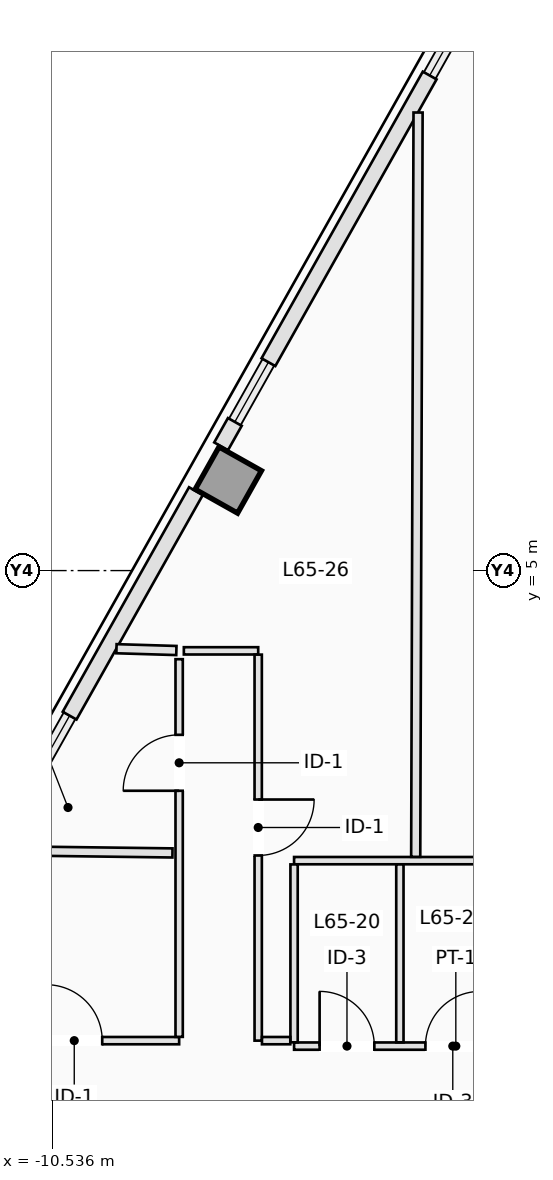
"""IFC4 building model, lengths in metres.
Left out: names, types, materials, properties, quantities, classifications, styles, units other than length and angle.
Written with IfcOpenShell. Run it as: python <this file> out.ifc"""

import sys

from ifc_helpers import new_model, si_unit, direction, frame, frame_2d, origin, origin_2d, place, context, subcontext, project, spatial, rectangle, extrude, element, fill, save


model = new_model("IFC4")
c1 = context("Model", 3, precision=1e-05, world=origin(), true_north=direction((0.0, 1.0)))
c2 = subcontext(c1, "Body", "Model", "MODEL_VIEW")
j1 = project(units=[si_unit("LENGTHUNIT", "METRE"), si_unit("PLANEANGLEUNIT", "RADIAN")], contexts=[c1])
p1 = place(None, origin())
s1 = spatial("IfcSite", under=j1, at=p1, CompositionType="ELEMENT")
p2 = place(p1, origin())
s2 = spatial("IfcBuilding", under=s1, at=p2, CompositionType="ELEMENT")
p3 = place(p2, frame((0.0, 0.0, 235.9)))
s3 = spatial("IfcBuildingStorey", under=s2, at=p3, CompositionType="ELEMENT", Elevation=235.9)
p4 = place(p3, frame((-7.642, 6.489, 0.0), z_axis=(0.0, 0.0, 1.0), x_axis=(-0.871575139605, 0.490261946333, 0.0)))
e1 = element("IfcColumn", 1, at=p4, inside=s3, PredefinedType="COLUMN", context=c2, shape_type="SweptSolid", body=[
    extrude(rectangle(XDim=0.8, YDim=0.8, at=origin_2d()), origin(), (0.0, 0.0, 1.0), 3.5),
])
p5 = place(p3, frame((-7.76, 7.044, 0.0), z_axis=(0.0, 0.0, 1.0), x_axis=(0.490412424957, 0.871490478116, 0.0)))
e2 = element("IfcWall", 2, at=p5, inside=s3, PredefinedType="STANDARD", context=c2, shape_type="SweptSolid", body=[
    extrude(rectangle(XDim=0.46, YDim=0.26, at=frame_2d((0.23, 0.0))), origin(), (0.0, 0.0, 1.0), 3.25),
])
p6 = place(p3, frame((-6.982, 8.427, 0.0), z_axis=(0.0, 0.0, 1.0), x_axis=(0.490265525523, 0.871573126297, 0.0)))
e3 = element("IfcWall", 3, at=p6, inside=s3, PredefinedType="STANDARD", context=c2, shape_type="SweptSolid", body=[
    extrude(rectangle(XDim=5.409, YDim=0.26, at=frame_2d((2.705, 0.0))), origin(), (0.0, 0.0, 1.0), 3.25),
])
p7 = place(p3, frame((-10.251, 2.615, 0.0), z_axis=(0.0, 0.0, 1.0), x_axis=(0.490269447258, 0.871570920284, 0.0)))
e4 = element("IfcWall", 4, at=p7, inside=s3, PredefinedType="STANDARD", context=c2, shape_type="SweptSolid", body=[
    extrude(rectangle(XDim=4.237, YDim=0.26, at=frame_2d((2.118, 0.0))), origin(), (0.0, 0.0, 1.0), 3.25),
])
p8 = place(p3, frame((-6.56, -2.82, 0.0), z_axis=(0.0, 0.0, 1.0), x_axis=(1.0, 0.0, 0.0)))
e5 = element("IfcWall", 5, at=p8, inside=s3, PredefinedType="PARTITIONING", context=c2, shape_type="SweptSolid", body=[
    extrude(rectangle(XDim=5.32, YDim=0.12, at=frame_2d((2.66, 0.0))), origin(), (0.0, 0.0, 1.0), 2.943),
])
p9 = place(p8, frame((0.42, 0.0, 0.0)))
e6 = element("IfcOpeningElement", 6, at=p9, cuts=e5, PredefinedType="OPENING", context=c2, shape_type="SweptSolid", body=[
    extrude(rectangle(XDim=0.9, YDim=2.12, at=frame_2d((0.45, 1.06))), frame((0.0, 0.07, 0.0), z_axis=(0.0, -1.0, 0.0), x_axis=(1.0, 0.0, 0.0)), (0.0, 0.0, 1.0), 0.14),
])
p10 = place(p8, frame((2.16, 0.0, 0.0)))
e7 = element("IfcOpeningElement", 7, at=p10, cuts=e5, PredefinedType="OPENING", context=c2, shape_type="SweptSolid", body=[
    extrude(rectangle(XDim=0.9, YDim=2.12, at=frame_2d((0.45, 1.06))), frame((0.0, 0.07, 0.0), z_axis=(0.0, -1.0, 0.0), x_axis=(1.0, 0.0, 0.0)), (0.0, 0.0, 1.0), 0.14),
])
p11 = place(p8, frame((3.92, 0.0, 0.0)))
e8 = element("IfcOpeningElement", 8, at=p11, cuts=e5, PredefinedType="OPENING", context=c2, shape_type="SweptSolid", body=[
    extrude(rectangle(XDim=0.9, YDim=2.12, at=frame_2d((0.45, 1.06))), frame((0.0, 0.07, 0.0), z_axis=(0.0, -1.0, 0.0), x_axis=(1.0, 0.0, 0.0)), (0.0, 0.0, 1.0), 0.14),
])
p12 = place(p3, frame((-6.56, 0.23, 0.0), z_axis=(0.0, 0.0, 1.0), x_axis=(1.0, 0.0, 0.0)))
e9 = element("IfcWall", 9, at=p12, inside=s3, PredefinedType="PARTITIONING", context=c2, shape_type="SweptSolid", body=[
    extrude(rectangle(XDim=5.32, YDim=0.12, at=frame_2d((2.66, 0.0))), origin(), (0.0, 0.0, 1.0), 3.25),
])
for number, where, z_axis, x_axis in (
    (10, (-6.56, -2.758, 0.0), (0.0, 0.0, 1.0), (0.0, 1.0, 0.0)),
    (11, (-4.82, -2.758, 0.0), (0.0, 0.0, 1.0), (0.0, 1.0, 0.0)),
):
    element("IfcWall", number, at=place(p3, frame(where, z_axis=z_axis, x_axis=x_axis)), inside=s3, PredefinedType="PARTITIONING", context=c2, shape_type="SweptSolid", body=[
        extrude(rectangle(XDim=2.926, YDim=0.12, at=frame_2d((1.463, 0.0))), origin(), (0.0, 0.0, 1.0), 3.25),
    ])
p13 = place(p3, frame((-11.838, -2.73, 0.0), z_axis=(0.0, 0.0, 1.0), x_axis=(1.0, 0.0, 0.0)))
e12 = element("IfcWall", 12, at=p13, inside=s3, PredefinedType="PARTITIONING", context=c2, shape_type="SweptSolid", body=[
    extrude(rectangle(XDim=3.388, YDim=0.12, at=frame_2d((1.694, 0.0))), origin(), (0.0, 0.0, 1.0), 3.25),
])
p14 = place(p13, frame((1.203, 0.0, 0.0)))
e13 = element("IfcOpeningElement", 13, at=p14, cuts=e12, PredefinedType="OPENING", context=c2, shape_type="SweptSolid", body=[
    extrude(rectangle(XDim=0.92, YDim=2.12, at=frame_2d((0.46, 1.06))), frame((0.0, 0.07, 0.0), z_axis=(0.0, -1.0, 0.0), x_axis=(1.0, 0.0, 0.0)), (0.0, 0.0, 1.0), 0.14),
])
p15 = place(p3, frame((-8.45, -2.668, 0.0), z_axis=(0.0, 0.0, 1.0), x_axis=(0.0, 1.0, 0.0)))
e14 = element("IfcWall", 14, at=p15, inside=s3, PredefinedType="PARTITIONING", context=c2, shape_type="SweptSolid", body=[
    extrude(rectangle(XDim=6.21, YDim=0.12, at=frame_2d((3.105, 0.0))), origin(), (0.0, 0.0, 1.0), 3.25),
])
p16 = place(p15, frame((4.047, 0.0, 0.0)))
e15 = element("IfcOpeningElement", 15, at=p16, cuts=e14, PredefinedType="OPENING", context=c2, shape_type="SweptSolid", body=[
    extrude(rectangle(XDim=0.92, YDim=2.12, at=frame_2d((0.46, 1.06))), frame((0.0, 0.07, 0.0), z_axis=(0.0, -1.0, 0.0), x_axis=(1.0, 0.0, 0.0)), (0.0, 0.0, 1.0), 0.14),
])
p17 = place(p3, frame((-8.373, 3.68, 0.0), z_axis=(0.0, 0.0, 1.0), x_axis=(1.0, 0.0, 0.0)))
e16 = element("IfcWall", 16, at=p17, inside=s3, PredefinedType="PARTITIONING", context=c2, shape_type="SweptSolid", body=[
    extrude(rectangle(XDim=1.223, YDim=0.12, at=frame_2d((0.611, 0.0))), origin(), (0.0, 0.0, 1.0), 3.25),
])
p18 = place(p3, frame((-7.15, 3.618, 0.0), z_axis=(0.0, 0.0, 1.0), x_axis=(0.0, -1.0, 0.0)))
e17 = element("IfcWall", 17, at=p18, inside=s3, PredefinedType="PARTITIONING", context=c2, shape_type="SweptSolid", body=[
    extrude(rectangle(XDim=6.348, YDim=0.12, at=frame_2d((3.174, 0.0))), origin(), (0.0, 0.0, 1.0), 3.25),
])
p19 = place(p18, frame((2.383, 0.0, 0.0)))
e18 = element("IfcOpeningElement", 18, at=p19, cuts=e17, PredefinedType="OPENING", context=c2, shape_type="SweptSolid", body=[
    extrude(rectangle(XDim=0.92, YDim=2.12, at=frame_2d((0.46, 1.06))), frame((0.0, 0.07, 0.0), z_axis=(0.0, -1.0, 0.0), x_axis=(1.0, 0.0, 0.0)), (0.0, 0.0, 1.0), 0.14),
])
p20 = place(p3, frame((-7.088, -2.73, 0.0), z_axis=(0.0, 0.0, 1.0), x_axis=(1.0, 0.0, 0.0)))
e19 = element("IfcWall", 19, at=p20, inside=s3, PredefinedType="PARTITIONING", context=c2, shape_type="SweptSolid", body=[
    extrude(rectangle(XDim=0.466, YDim=0.12, at=frame_2d((0.233, 0.0))), origin(), (0.0, 0.0, 1.0), 3.25),
])
p21 = place(p3, frame((-4.56, 0.292, 0.0), z_axis=(0.0, 0.0, 1.0), x_axis=(0.003171231411, 0.999994971633, 0.0)))
e20 = element("IfcWall", 20, at=p21, inside=s3, PredefinedType="PARTITIONING", context=c2, shape_type="SweptSolid", body=[
    extrude(rectangle(XDim=12.241, YDim=0.15, at=frame_2d((6.12, 0.0))), origin(), (0.0, 0.0, 1.0), 3.25),
])
p22 = place(p3, frame((-8.496, 3.685, 0.0), z_axis=(0.0, 0.0, 1.0), x_axis=(-0.99954299591, 0.030229113907, 0.0)))
e21 = element("IfcWall", 21, at=p22, inside=s3, PredefinedType="PARTITIONING", context=c2, shape_type="SweptSolid", body=[
    extrude(rectangle(XDim=0.985, YDim=0.15, at=frame_2d((0.493, 0.0))), origin(), (0.0, 0.0, 1.0), 3.25),
])
p23 = place(p3, frame((-8.56, 0.357, 0.0), z_axis=(0.0, 0.0, 1.0), x_axis=(-0.999917251082, 0.012864330116, 0.0)))
e22 = element("IfcWall", 22, at=p23, inside=s3, PredefinedType="PARTITIONING", context=c2, shape_type="SweptSolid", body=[
    extrude(rectangle(XDim=2.79, YDim=0.15, at=frame_2d((1.395, 0.0))), origin(), (0.0, 0.0, 1.0), 3.25),
])
p24 = place(p9, origin())
e23 = element("IfcDoor", 23, at=p24, inside=s3, OperationType="SINGLE_SWING_LEFT", PredefinedType="DOOR", context=c2, shape_type="SweptSolid", body=[
    extrude(rectangle(XDim=0.9, YDim=2.12, at=frame_2d((0.45, 1.06))), frame((0.0, 0.025, 0.0), z_axis=(0.0, -1.0, 0.0), x_axis=(1.0, 0.0, 0.0)), (0.0, 0.0, 1.0), 0.05),
])
fill(e6, e23)
p25 = place(p10, origin())
e24 = element("IfcDoor", 24, at=p25, inside=s3, OperationType="SINGLE_SWING_RIGHT", PredefinedType="DOOR", context=c2, shape_type="SweptSolid", body=[
    extrude(rectangle(XDim=0.9, YDim=2.12, at=frame_2d((0.45, 1.06))), frame((0.0, 0.025, 0.0), z_axis=(0.0, -1.0, 0.0), x_axis=(1.0, 0.0, 0.0)), (0.0, 0.0, 1.0), 0.05),
])
fill(e7, e24)
p26 = place(p19, origin())
e25 = element("IfcDoor", 25, at=p26, inside=s3, OperationType="SINGLE_SWING_LEFT", PredefinedType="DOOR", context=c2, shape_type="SweptSolid", body=[
    extrude(rectangle(XDim=0.92, YDim=2.12, at=frame_2d((0.46, 1.06))), frame((0.0, 0.025, 0.0), z_axis=(0.0, -1.0, 0.0), x_axis=(1.0, 0.0, 0.0)), (0.0, 0.0, 1.0), 0.05),
])
fill(e18, e25)
p27 = place(p16, origin())
e26 = element("IfcDoor", 26, at=p27, inside=s3, OperationType="SINGLE_SWING_LEFT", PredefinedType="DOOR", context=c2, shape_type="SweptSolid", body=[
    extrude(rectangle(XDim=0.92, YDim=2.12, at=frame_2d((0.46, 1.06))), frame((0.0, 0.025, 0.0), z_axis=(0.0, -1.0, 0.0), x_axis=(1.0, 0.0, 0.0)), (0.0, 0.0, 1.0), 0.05),
])
fill(e15, e26)
p28 = place(p14, origin())
e27 = element("IfcDoor", 27, at=p28, inside=s3, OperationType="SINGLE_SWING_LEFT", PredefinedType="DOOR", context=c2, shape_type="SweptSolid", body=[
    extrude(rectangle(XDim=0.92, YDim=2.12, at=frame_2d((0.46, 1.06))), frame((0.0, 0.025, 0.0), z_axis=(0.0, -1.0, 0.0), x_axis=(1.0, 0.0, 0.0)), (0.0, 0.0, 1.0), 0.05),
])
fill(e13, e27)
save(model, sys.argv[1])
